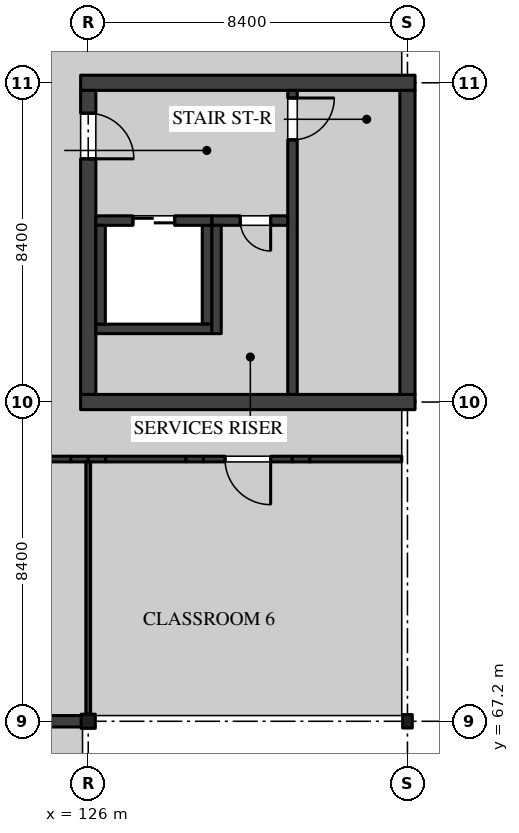
"""IFC4 building model, lengths in metres.
Left out: names, types, materials, properties, quantities, classifications, styles, units other than length and angle.
Written with IfcOpenShell. Run it as: python <this file> out.ifc"""

import sys

from ifc_helpers import new_model, si_unit, direction, frame, frame_2d, origin, origin_2d, place, context, subcontext, project, spatial, rectangle, i_section, extrude, element, fill, save


model = new_model("IFC4")
c1 = context("Model", 3, precision=1e-05, world=origin(), true_north=direction((0.0, 1.0)))
c2 = subcontext(c1, "Body", "Model", "MODEL_VIEW")
j1 = project(units=[si_unit("LENGTHUNIT", "METRE"), si_unit("PLANEANGLEUNIT", "RADIAN")], contexts=[c1])
p1 = place(None, origin())
s1 = spatial("IfcSite", under=j1, at=p1, CompositionType="ELEMENT")
p2 = place(p1, origin())
s2 = spatial("IfcBuilding", under=s1, at=p2, CompositionType="ELEMENT")
p3 = place(p2, frame((0.0, 0.0, 14.4)))
s3 = spatial("IfcBuildingStorey", under=s2, at=p3, CompositionType="ELEMENT", Elevation=14.4)
p4 = place(p3, frame((126.0, 67.2, 0.0), z_axis=(0.0, 0.0, 1.0), x_axis=(1.0, 0.0, 0.0)))
e1 = element("IfcColumn", 1, at=p4, inside=s3, PredefinedType="COLUMN", context=c2, shape_type="SweptSolid", body=[
    extrude(i_section(OverallWidth=0.373, OverallDepth=0.373, WebThickness=0.016, FlangeThickness=0.026, FilletRadius=0.015, at=origin_2d()), origin(), (0.0, 0.0, 1.0), 4.37),
])
p5 = place(p3, frame((134.4, 67.2, 0.0), z_axis=(0.0, 0.0, 1.0), x_axis=(1.0, 0.0, 0.0)))
e2 = element("IfcColumn", 2, at=p5, inside=s3, PredefinedType="COLUMN", context=c2, shape_type="SweptSolid", body=[
    extrude(i_section(OverallWidth=0.254, OverallDepth=0.353, WebThickness=0.01, FlangeThickness=0.016, FilletRadius=0.015, at=origin_2d()), origin(), (0.0, 0.0, 1.0), 4.37),
])
for number, where, z_axis, x_axis in (
    (3, (125.8, 75.6, 0.0), (0.0, 0.0, 1.0), (1.0, 0.0, 0.0)),
    (4, (125.8, 84.0, 0.0), (0.0, 0.0, 1.0), (1.0, 0.0, 0.0)),
):
    element("IfcWall", number, at=place(p3, frame(where, z_axis=z_axis, x_axis=x_axis)), inside=s3, PredefinedType="SHEAR", context=c2, shape_type="SweptSolid", body=[
        extrude(rectangle(XDim=8.8, YDim=0.4, at=frame_2d((4.4, 0.0))), origin(), (0.0, 0.0, 1.0), 4.37),
    ])
p6 = place(p3, frame((126.0, 75.8, 0.0), z_axis=(0.0, 0.0, 1.0), x_axis=(0.0, 1.0, 0.0)))
e5 = element("IfcWall", 5, at=p6, inside=s3, PredefinedType="SHEAR", context=c2, shape_type="SweptSolid", body=[
    extrude(rectangle(XDim=8.0, YDim=0.4, at=frame_2d((4.0, 0.0))), origin(), (0.0, 0.0, 1.0), 4.37),
])
p7 = place(p6, frame((6.2, 0.0, 0.0)))
e6 = element("IfcOpeningElement", 6, at=p7, cuts=e5, PredefinedType="OPENING", context=c2, shape_type="SweptSolid", body=[
    extrude(rectangle(XDim=1.2, YDim=2.1, at=frame_2d((0.6, 1.05))), frame((0.0, 0.21, 0.0), z_axis=(0.0, -1.0, 0.0), x_axis=(1.0, 0.0, 0.0)), (0.0, 0.0, 1.0), 0.42),
])
p8 = place(p3, frame((134.4, 75.8, 0.0), z_axis=(0.0, 0.0, 1.0), x_axis=(0.0, 1.0, 0.0)))
e7 = element("IfcWall", 7, at=p8, inside=s3, PredefinedType="SHEAR", context=c2, shape_type="SweptSolid", body=[
    extrude(rectangle(XDim=8.0, YDim=0.4, at=frame_2d((4.0, 0.0))), origin(), (0.0, 0.0, 1.0), 4.37),
])
p9 = place(p3, frame((131.375, 83.8, 0.0), z_axis=(0.0, 0.0, 1.0), x_axis=(0.0, -1.0, 0.0)))
e8 = element("IfcWall", 8, at=p9, inside=s3, PredefinedType="SOLIDWALL", context=c2, shape_type="SweptSolid", body=[
    extrude(rectangle(XDim=8.0, YDim=0.25, at=frame_2d((4.0, 0.0))), origin(), (0.0, 0.0, 1.0), 4.37),
])
p10 = place(p9, frame((0.2, 0.0, 0.0)))
e9 = element("IfcOpeningElement", 9, at=p10, cuts=e8, PredefinedType="OPENING", context=c2, shape_type="SweptSolid", body=[
    extrude(rectangle(XDim=1.1, YDim=2.1, at=frame_2d((0.55, 1.05))), frame((0.0, 0.135, 0.0), z_axis=(0.0, -1.0, 0.0), x_axis=(1.0, 0.0, 0.0)), (0.0, 0.0, 1.0), 0.27),
])
p11 = place(p3, frame((131.25, 80.375, 0.0), z_axis=(0.0, 0.0, 1.0), x_axis=(-1.0, 0.0, 0.0)))
e10 = element("IfcWall", 10, at=p11, inside=s3, PredefinedType="SOLIDWALL", context=c2, shape_type="SweptSolid", body=[
    extrude(rectangle(XDim=2.0, YDim=0.25, at=frame_2d((1.0, 0.0))), origin(), (0.0, 0.0, 1.0), 4.37),
])
p12 = place(p11, frame((0.45, 0.0, 0.0)))
e11 = element("IfcOpeningElement", 11, at=p12, cuts=e10, PredefinedType="OPENING", context=c2, shape_type="SweptSolid", body=[
    extrude(rectangle(XDim=0.8, YDim=2.1, at=frame_2d((0.4, 1.05))), frame((0.0, 0.135, 0.0), z_axis=(0.0, -1.0, 0.0), x_axis=(1.0, 0.0, 0.0)), (0.0, 0.0, 1.0), 0.27),
])
p13 = place(p3, frame((129.375, 80.25, 0.0), z_axis=(0.0, 0.0, 1.0), x_axis=(0.0, -1.0, 0.0)))
e12 = element("IfcWall", 12, at=p13, inside=s3, PredefinedType="SOLIDWALL", context=c2, shape_type="SweptSolid", body=[
    extrude(rectangle(XDim=2.85, YDim=0.25, at=frame_2d((1.425, 0.0))), origin(), (0.0, 0.0, 1.0), 4.37),
])
p14 = place(p3, frame((129.125, 77.65, 0.0), z_axis=(0.0, 0.0, 1.0), x_axis=(0.0, 1.0, 0.0)))
e13 = element("IfcWall", 13, at=p14, inside=s3, PredefinedType="SOLIDWALL", context=c2, shape_type="SweptSolid", body=[
    extrude(rectangle(XDim=2.6, YDim=0.25, at=frame_2d((1.3, 0.0))), origin(), (0.0, 0.0, 1.0), 4.37),
])
p15 = place(p3, frame((126.2, 80.375, 0.0), z_axis=(0.0, 0.0, 1.0), x_axis=(1.0, 0.0, 0.0)))
e14 = element("IfcWall", 14, at=p15, inside=s3, PredefinedType="SOLIDWALL", context=c2, shape_type="SweptSolid", body=[
    extrude(rectangle(XDim=3.05, YDim=0.25, at=frame_2d((1.525, 0.0))), origin(), (0.0, 0.0, 1.0), 4.37),
])
p16 = place(p15, frame((0.975, 0.0, 0.0)))
e15 = element("IfcOpeningElement", 15, at=p16, cuts=e14, PredefinedType="OPENING", context=c2, shape_type="SweptSolid", body=[
    extrude(rectangle(XDim=1.1, YDim=2.1, at=frame_2d((0.55, 1.05))), frame((0.0, 0.135, 0.0), z_axis=(0.0, -1.0, 0.0), x_axis=(1.0, 0.0, 0.0)), (0.0, 0.0, 1.0), 0.27),
])
p17 = place(p3, frame((126.2, 77.525, 0.0), z_axis=(0.0, 0.0, 1.0), x_axis=(1.0, 0.0, 0.0)))
e16 = element("IfcWall", 16, at=p17, inside=s3, PredefinedType="SOLIDWALL", context=c2, shape_type="SweptSolid", body=[
    extrude(rectangle(XDim=3.05, YDim=0.25, at=frame_2d((1.525, 0.0))), origin(), (0.0, 0.0, 1.0), 4.37),
])
p18 = place(p3, frame((126.325, 77.65, 0.0), z_axis=(0.0, 0.0, 1.0), x_axis=(0.0, 1.0, 0.0)))
e17 = element("IfcWall", 17, at=p18, inside=s3, PredefinedType="SOLIDWALL", context=c2, shape_type="SweptSolid", body=[
    extrude(rectangle(XDim=2.6, YDim=0.25, at=frame_2d((1.3, 0.0))), origin(), (0.0, 0.0, 1.0), 4.37),
])
p19 = place(p3, frame((123.43, 74.1, 0.0), z_axis=(0.0, 0.0, 1.0), x_axis=(1.0, 0.0, 0.0)))
e18 = element("IfcWall", 18, at=p19, inside=s3, PredefinedType="PARTITIONING", context=c2, shape_type="SweptSolid", body=[
    extrude(rectangle(XDim=2.11, YDim=0.15, at=frame_2d((1.055, 0.0))), origin(), (0.0, 0.0, 1.0), 4.37),
])
p20 = place(p19, frame((0.22, 0.0, 0.0)))
e19 = element("IfcOpeningElement", 19, at=p20, cuts=e18, PredefinedType="OPENING", context=c2, shape_type="SweptSolid", body=[
    extrude(rectangle(XDim=1.2, YDim=2.4, at=frame_2d((0.6, 1.2))), frame((0.0, 0.085, 0.0), z_axis=(0.0, -1.0, 0.0), x_axis=(1.0, 0.0, 0.0)), (0.0, 0.0, 1.0), 0.17),
])
for number, where, z_axis, x_axis in (
    (20, (125.54, 74.1, 0.0), (0.0, 0.0, 1.0), (1.0, 0.0, 0.0)),
    (21, (126.0, 74.1, 0.0), (0.0, 0.0, 1.0), (1.0, 0.0, 0.0)),
):
    element("IfcWall", number, at=place(p3, frame(where, z_axis=z_axis, x_axis=x_axis)), inside=s3, PredefinedType="PARTITIONING", context=c2, shape_type="SweptSolid", body=[
        extrude(rectangle(XDim=0.46, YDim=0.15, at=frame_2d((0.23, 0.0))), origin(), (0.0, 0.0, 1.0), 3.746),
    ])
p21 = place(p3, frame((126.46, 74.1, 0.0), z_axis=(0.0, 0.0, 1.0), x_axis=(1.0, 0.0, 0.0)))
e22 = element("IfcWall", 22, at=p21, inside=s3, PredefinedType="PARTITIONING", context=c2, shape_type="SweptSolid", body=[
    extrude(rectangle(XDim=2.11, YDim=0.15, at=frame_2d((1.055, 0.0))), origin(), (0.0, 0.0, 1.0), 4.37),
])
p22 = place(p3, frame((128.57, 74.1, 0.0), z_axis=(0.0, 0.0, 1.0), x_axis=(1.0, 0.0, 0.0)))
e23 = element("IfcWall", 23, at=p22, inside=s3, PredefinedType="PARTITIONING", context=c2, shape_type="SweptSolid", body=[
    extrude(rectangle(XDim=0.46, YDim=0.15, at=frame_2d((0.23, 0.0))), origin(), (0.0, 0.0, 1.0), 3.895),
])
p23 = place(p3, frame((129.03, 74.1, 0.0), z_axis=(0.0, 0.0, 1.0), x_axis=(1.0, 0.0, 0.0)))
e24 = element("IfcWall", 24, at=p23, inside=s3, PredefinedType="PARTITIONING", context=c2, shape_type="SweptSolid", body=[
    extrude(rectangle(XDim=2.34, YDim=0.15, at=frame_2d((1.17, 0.0))), origin(), (0.0, 0.0, 1.0), 4.37),
])
p24 = place(p23, frame((0.57, 0.0, 0.0)))
e25 = element("IfcOpeningElement", 25, at=p24, cuts=e24, PredefinedType="OPENING", context=c2, shape_type="SweptSolid", body=[
    extrude(rectangle(XDim=1.2, YDim=2.4, at=frame_2d((0.6, 1.2))), frame((0.0, 0.085, 0.0), z_axis=(0.0, -1.0, 0.0), x_axis=(1.0, 0.0, 0.0)), (0.0, 0.0, 1.0), 0.17),
])
p25 = place(p3, frame((131.37, 74.1, 0.0), z_axis=(0.0, 0.0, 1.0), x_axis=(1.0, 0.0, 0.0)))
e26 = element("IfcWall", 26, at=p25, inside=s3, PredefinedType="PARTITIONING", context=c2, shape_type="SweptSolid", body=[
    extrude(rectangle(XDim=0.46, YDim=0.15, at=frame_2d((0.23, 0.0))), origin(), (0.0, 0.0, 1.0), 3.895),
])
p26 = place(p3, frame((131.83, 74.1, 0.0), z_axis=(0.0, 0.0, 1.0), x_axis=(1.0, 0.0, 0.0)))
e27 = element("IfcWall", 27, at=p26, inside=s3, PredefinedType="PARTITIONING", context=c2, shape_type="SweptSolid", body=[
    extrude(rectangle(XDim=2.42, YDim=0.15, at=frame_2d((1.21, 0.0))), origin(), (0.0, 0.0, 1.0), 4.37),
])
p27 = place(p3, frame((126.0, 67.386, 0.0), z_axis=(0.0, 0.0, 1.0), x_axis=(0.0, 1.0, 0.0)))
e28 = element("IfcWall", 28, at=p27, inside=s3, PredefinedType="PARTITIONING", context=c2, shape_type="SweptSolid", body=[
    extrude(rectangle(XDim=6.639, YDim=0.125, at=frame_2d((3.319, 0.0))), origin(), (0.0, 0.0, 1.0), 3.746),
])
p28 = place(p3, frame((125.998, 67.2, 0.0), z_axis=(0.0, 0.0, 1.0), x_axis=(-1.0, 0.0, 0.0)))
e29 = element("IfcWall", 29, at=p28, inside=s3, PredefinedType="SOLIDWALL", context=c2, shape_type="SweptSolid", body=[
    extrude(rectangle(XDim=8.198, YDim=0.3, at=frame_2d((4.099, 0.0))), origin(), (0.0, 0.0, 1.0), 3.746),
])
p29 = place(p7, frame((1.2, 0.0, 0.0), z_axis=(0.0, 0.0, 1.0), x_axis=(-1.0, 0.0, 0.0)))
e30 = element("IfcDoor", 30, at=p29, inside=s3, OperationType="SINGLE_SWING_LEFT", PredefinedType="DOOR", context=c2, shape_type="SweptSolid", body=[
    extrude(rectangle(XDim=1.2, YDim=2.1, at=frame_2d((0.6, 1.05))), frame((0.0, 0.035, 0.0), z_axis=(0.0, -1.0, 0.0), x_axis=(1.0, 0.0, 0.0)), (0.0, 0.0, 1.0), 0.07),
])
fill(e6, e30)
p30 = place(p12, origin())
e31 = element("IfcDoor", 31, at=p30, inside=s3, OperationType="SINGLE_SWING_RIGHT", PredefinedType="DOOR", context=c2, shape_type="SweptSolid", body=[
    extrude(rectangle(XDim=0.8, YDim=2.1, at=frame_2d((0.4, 1.05))), frame((0.0, 0.035, 0.0), z_axis=(0.0, -1.0, 0.0), x_axis=(1.0, 0.0, 0.0)), (0.0, 0.0, 1.0), 0.07),
])
fill(e11, e31)
p31 = place(p10, origin())
e32 = element("IfcDoor", 32, at=p31, inside=s3, OperationType="SINGLE_SWING_RIGHT", PredefinedType="DOOR", context=c2, shape_type="SweptSolid", body=[
    extrude(rectangle(XDim=1.1, YDim=2.1, at=frame_2d((0.55, 1.05))), frame((0.0, 0.035, 0.0), z_axis=(0.0, -1.0, 0.0), x_axis=(1.0, 0.0, 0.0)), (0.0, 0.0, 1.0), 0.07),
])
fill(e9, e32)
p32 = place(p16, origin())
e33 = element("IfcDoor", 33, at=p32, inside=s3, OperationType="DOUBLE_DOOR_SLIDING", PredefinedType="DOOR", context=c2, shape_type="SweptSolid", body=[
    extrude(rectangle(XDim=1.1, YDim=2.1, at=frame_2d((0.55, 1.05))), frame((0.0, 0.04, 0.0), z_axis=(0.0, -1.0, 0.0), x_axis=(1.0, 0.0, 0.0)), (0.0, 0.0, 1.0), 0.08),
])
fill(e15, e33)
p33 = place(p24, frame((1.2, 0.0, 0.0), z_axis=(0.0, 0.0, 1.0), x_axis=(-1.0, 0.0, 0.0)))
e34 = element("IfcDoor", 34, at=p33, inside=s3, OperationType="SINGLE_SWING_RIGHT", PredefinedType="DOOR", context=c2, shape_type="SweptSolid", body=[
    extrude(rectangle(XDim=1.2, YDim=2.4, at=frame_2d((0.6, 1.2))), frame((0.0, 0.025, 0.0), z_axis=(0.0, -1.0, 0.0), x_axis=(1.0, 0.0, 0.0)), (0.0, 0.0, 1.0), 0.05),
])
fill(e25, e34)
save(model, sys.argv[1])
